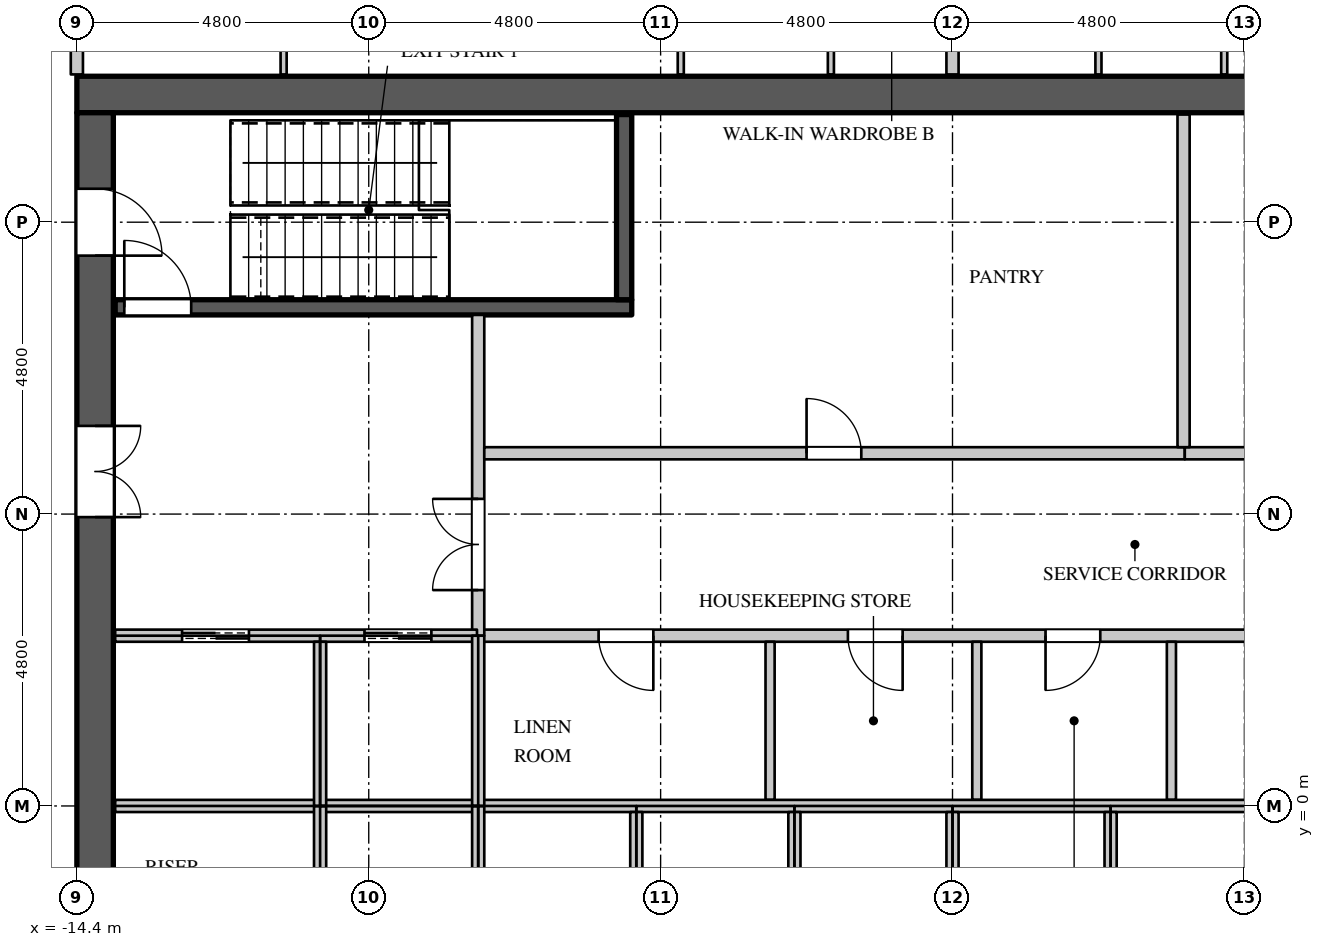
"""IFC4 building model, lengths in metres.
Left out: names, types, materials, properties, quantities, classifications, styles, units other than length and angle.
Written with IfcOpenShell. Run it as: python <this file> out.ifc"""

import sys

from ifc_helpers import new_model, si_unit, direction, frame, frame_2d, origin, place, context, subcontext, project, spatial, rectangle, extrude, element, fill, save


model = new_model("IFC4")
c1 = context("Model", 3, precision=1e-05, world=origin(), true_north=direction((0.0, 1.0)))
c2 = subcontext(c1, "Body", "Model", "MODEL_VIEW")
j1 = project(units=[si_unit("LENGTHUNIT", "METRE"), si_unit("PLANEANGLEUNIT", "RADIAN")], contexts=[c1])
p1 = place(None, origin())
s1 = spatial("IfcSite", under=j1, at=p1, CompositionType="ELEMENT")
p2 = place(p1, origin())
s2 = spatial("IfcBuilding", under=s1, at=p2, CompositionType="ELEMENT")
p3 = place(p2, frame((0.0, 0.0, 306.3)))
s3 = spatial("IfcBuildingStorey", under=s2, at=p3, CompositionType="ELEMENT", Elevation=306.3)
p4 = place(p3, frame((-14.4, 11.7, 0.0), z_axis=(0.0, 0.0, 1.0), x_axis=(1.0, 0.0, 0.0)))
e1 = element("IfcWall", 1, at=p4, inside=s3, PredefinedType="SHEAR", context=c2, shape_type="SweptSolid", body=[
    extrude(rectangle(XDim=28.8, YDim=0.6, at=frame_2d((14.4, 0.0))), origin(), (0.0, 0.0, 1.0), 4.2),
])
p5 = place(p3, frame((-14.1, -11.4, 0.0), z_axis=(0.0, 0.0, 1.0), x_axis=(0.0, 1.0, 0.0)))
e2 = element("IfcWall", 2, at=p5, inside=s3, PredefinedType="SHEAR", context=c2, shape_type="SweptSolid", body=[
    extrude(rectangle(XDim=22.8, YDim=0.6, at=frame_2d((11.4, 0.0))), origin(), (0.0, 0.0, 1.0), 4.2),
])
p6 = place(p5, frame((20.45, 0.0, 0.0)))
e3 = element("IfcOpeningElement", 3, at=p6, cuts=e2, PredefinedType="OPENING", context=c2, shape_type="SweptSolid", body=[
    extrude(rectangle(XDim=1.1, YDim=2.2, at=frame_2d((0.55, 1.1))), frame((0.0, 0.31, 0.0), z_axis=(0.0, -1.0, 0.0), x_axis=(1.0, 0.0, 0.0)), (0.0, 0.0, 1.0), 0.62),
])
p7 = place(p5, frame((1.25, 0.0, 0.0)))
e4 = element("IfcOpeningElement", 4, at=p7, cuts=e2, PredefinedType="OPENING", context=c2, shape_type="SweptSolid", body=[
    extrude(rectangle(XDim=1.1, YDim=2.2, at=frame_2d((0.55, 1.1))), frame((0.0, 0.31, 0.0), z_axis=(0.0, -1.0, 0.0), x_axis=(1.0, 0.0, 0.0)), (0.0, 0.0, 1.0), 0.62),
])
p8 = place(p5, frame((16.15, 0.0, 0.0)))
e5 = element("IfcOpeningElement", 5, at=p8, cuts=e2, PredefinedType="OPENING", context=c2, shape_type="SweptSolid", body=[
    extrude(rectangle(XDim=1.5, YDim=2.4, at=frame_2d((0.75, 1.2))), frame((0.0, 0.31, 0.0), z_axis=(0.0, -1.0, 0.0), x_axis=(1.0, 0.0, 0.0)), (0.0, 0.0, 1.0), 0.62),
])
p9 = place(p5, frame((5.15, 0.0, 0.0)))
e6 = element("IfcOpeningElement", 6, at=p9, cuts=e2, PredefinedType="OPENING", context=c2, shape_type="SweptSolid", body=[
    extrude(rectangle(XDim=1.5, YDim=2.4, at=frame_2d((0.75, 1.2))), frame((0.0, 0.31, 0.0), z_axis=(0.0, -1.0, 0.0), x_axis=(1.0, 0.0, 0.0)), (0.0, 0.0, 1.0), 0.62),
])
p10 = place(p3, frame((-14.4, 12.03, 0.0), z_axis=(0.0, 0.0, 1.0), x_axis=(0.0, 1.0, 0.0)))
e7 = element("IfcWall", 7, at=p10, inside=s3, PredefinedType="PARTITIONING", context=c2, shape_type="SweptSolid", body=[
    extrude(rectangle(XDim=2.27, YDim=0.2, at=frame_2d((1.135, 0.0))), origin(), (0.0, 0.0, 1.0), 3.9),
])
p11 = place(p3, frame((-7.82, 2.8, 0.0), z_axis=(0.0, 0.0, 1.0), x_axis=(1.0, 0.0, 0.0)))
e8 = element("IfcWall", 8, at=p11, inside=s3, PredefinedType="PARTITIONING", context=c2, shape_type="SweptSolid", body=[
    extrude(rectangle(XDim=18.24, YDim=0.2, at=frame_2d((9.12, 0.0))), origin(), (0.0, 0.0, 1.0), 3.9),
])
p12 = place(p11, frame((2.0, 0.0, 0.0)))
e9 = element("IfcOpeningElement", 9, at=p12, cuts=e8, PredefinedType="OPENING", context=c2, shape_type="SweptSolid", body=[
    extrude(rectangle(XDim=0.9, YDim=2.2, at=frame_2d((0.45, 1.1))), frame((0.0, 0.11, 0.0), z_axis=(0.0, -1.0, 0.0), x_axis=(1.0, 0.0, 0.0)), (0.0, 0.0, 1.0), 0.22),
])
p13 = place(p11, frame((6.1, 0.0, 0.0)))
e10 = element("IfcOpeningElement", 10, at=p13, cuts=e8, PredefinedType="OPENING", context=c2, shape_type="SweptSolid", body=[
    extrude(rectangle(XDim=0.9, YDim=2.2, at=frame_2d((0.45, 1.1))), frame((0.0, 0.11, 0.0), z_axis=(0.0, -1.0, 0.0), x_axis=(1.0, 0.0, 0.0)), (0.0, 0.0, 1.0), 0.22),
])
p14 = place(p11, frame((9.35, 0.0, 0.0)))
e11 = element("IfcOpeningElement", 11, at=p14, cuts=e8, PredefinedType="OPENING", context=c2, shape_type="SweptSolid", body=[
    extrude(rectangle(XDim=0.9, YDim=2.2, at=frame_2d((0.45, 1.1))), frame((0.0, 0.11, 0.0), z_axis=(0.0, -1.0, 0.0), x_axis=(1.0, 0.0, 0.0)), (0.0, 0.0, 1.0), 0.22),
])
p15 = place(p11, frame((14.3, 0.0, 0.0)))
e12 = element("IfcOpeningElement", 12, at=p15, cuts=e8, PredefinedType="OPENING", context=c2, shape_type="SweptSolid", body=[
    extrude(rectangle(XDim=0.9, YDim=2.2, at=frame_2d((0.45, 1.1))), frame((0.0, 0.11, 0.0), z_axis=(0.0, -1.0, 0.0), x_axis=(1.0, 0.0, 0.0)), (0.0, 0.0, 1.0), 0.22),
])
p16 = place(p3, frame((-7.8, 2.8, 0.0), z_axis=(0.0, 0.0, 1.0), x_axis=(0.0, 1.0, 0.0)))
e13 = element("IfcWall", 13, at=p16, inside=s3, PredefinedType="PARTITIONING", context=c2, shape_type="SweptSolid", body=[
    extrude(rectangle(XDim=5.275, YDim=0.2, at=frame_2d((2.637, 0.0))), origin(), (0.0, 0.0, 1.0), 3.9),
])
p17 = place(p16, frame((0.75, 0.0, 0.0)))
e14 = element("IfcOpeningElement", 14, at=p17, cuts=e13, PredefinedType="OPENING", context=c2, shape_type="SweptSolid", body=[
    extrude(rectangle(XDim=1.5, YDim=2.4, at=frame_2d((0.75, 1.2))), frame((0.0, 0.11, 0.0), z_axis=(0.0, -1.0, 0.0), x_axis=(1.0, 0.0, 0.0)), (0.0, 0.0, 1.0), 0.22),
])
p18 = place(p3, frame((-7.7, 5.8, 0.0), z_axis=(0.0, 0.0, 1.0), x_axis=(1.0, 0.0, 0.0)))
e15 = element("IfcWall", 15, at=p18, inside=s3, PredefinedType="PARTITIONING", context=c2, shape_type="SweptSolid", body=[
    extrude(rectangle(XDim=11.52, YDim=0.2, at=frame_2d((5.76, 0.0))), origin(), (0.0, 0.0, 1.0), 3.9),
])
p19 = place(p18, frame((5.3, 0.0, 0.0)))
e16 = element("IfcOpeningElement", 16, at=p19, cuts=e15, PredefinedType="OPENING", context=c2, shape_type="SweptSolid", body=[
    extrude(rectangle(XDim=0.9, YDim=2.2, at=frame_2d((0.45, 1.1))), frame((0.0, 0.11, 0.0), z_axis=(0.0, -1.0, 0.0), x_axis=(1.0, 0.0, 0.0)), (0.0, 0.0, 1.0), 0.22),
])
for number, where, z_axis, x_axis in (
    (17, (-3.0, 0.1, 0.0), (0.0, 0.0, 1.0), (0.0, 1.0, 0.0)),
    (18, (0.4, 0.1, 0.0), (0.0, 0.0, 1.0), (0.0, 1.0, 0.0)),
    (19, (3.6, 0.1, 0.0), (0.0, 0.0, 1.0), (0.0, 1.0, 0.0)),
):
    element("IfcWall", number, at=place(p3, frame(where, z_axis=z_axis, x_axis=x_axis)), inside=s3, PredefinedType="PARTITIONING", context=c2, shape_type="SweptSolid", body=[
        extrude(rectangle(XDim=2.6, YDim=0.15, at=frame_2d((1.3, 0.0))), origin(), (0.0, 0.0, 1.0), 3.9),
    ])
p20 = place(p3, frame((0.0, 12.03, 0.0), z_axis=(0.0, 0.0, 1.0), x_axis=(0.0, 1.0, 0.0)))
e20 = element("IfcWall", 20, at=p20, inside=s3, PredefinedType="PARTITIONING", context=c2, shape_type="SweptSolid", body=[
    extrude(rectangle(XDim=14.425, YDim=0.2, at=frame_2d((7.212, 0.0))), origin(), (0.0, 0.0, 1.0), 3.9),
])
p21 = place(p3, frame((3.82, 5.8, 0.0), z_axis=(0.0, 0.0, 1.0), x_axis=(1.0, 0.0, 0.0)))
e21 = element("IfcWall", 21, at=p21, inside=s3, PredefinedType="PARTITIONING", context=c2, shape_type="SweptSolid", body=[
    extrude(rectangle(XDim=9.95, YDim=0.2, at=frame_2d((4.975, 0.0))), origin(), (0.0, 0.0, 1.0), 3.9),
])
p22 = place(p21, frame((4.5, 0.0, 0.0)))
e22 = element("IfcOpeningElement", 22, at=p22, cuts=e21, PredefinedType="OPENING", context=c2, shape_type="SweptSolid", body=[
    extrude(rectangle(XDim=0.9, YDim=2.2, at=frame_2d((0.45, 1.1))), frame((0.0, 0.11, 0.0), z_axis=(0.0, -1.0, 0.0), x_axis=(1.0, 0.0, 0.0)), (0.0, 0.0, 1.0), 0.22),
])
p23 = place(p3, frame((3.8, 5.9, 0.0), z_axis=(0.0, 0.0, 1.0), x_axis=(0.0, 1.0, 0.0)))
e23 = element("IfcWall", 23, at=p23, inside=s3, PredefinedType="PARTITIONING", context=c2, shape_type="SweptSolid", body=[
    extrude(rectangle(XDim=5.47, YDim=0.2, at=frame_2d((2.735, 0.0))), origin(), (0.0, 0.0, 1.0), 3.9),
])
p24 = place(p3, frame((-13.77, 0.0, 0.0), z_axis=(0.0, 0.0, 1.0), x_axis=(1.0, 0.0, 0.0)))
e24 = element("IfcWall", 24, at=p24, inside=s3, PredefinedType="PARTITIONING", context=c2, shape_type="SweptSolid", body=[
    extrude(rectangle(XDim=21.57, YDim=0.2, at=frame_2d((10.785, 0.0))), origin(), (0.0, 0.0, 1.0), 3.9),
])
p25 = place(p3, frame((-13.77, 2.8, 0.0), z_axis=(0.0, 0.0, 1.0), x_axis=(1.0, 0.0, 0.0)))
e25 = element("IfcWall", 25, at=p25, inside=s3, PredefinedType="PARTITIONING", context=c2, shape_type="SweptSolid", body=[
    extrude(rectangle(XDim=5.95, YDim=0.2, at=frame_2d((2.975, 0.0))), origin(), (0.0, 0.0, 1.0), 3.9),
])
p26 = place(p25, frame((1.1, 0.0, 0.0)))
e26 = element("IfcOpeningElement", 26, at=p26, cuts=e25, PredefinedType="OPENING", context=c2, shape_type="SweptSolid", body=[
    extrude(rectangle(XDim=1.1, YDim=2.2, at=frame_2d((0.55, 1.1))), frame((0.0, 0.11, 0.0), z_axis=(0.0, -1.0, 0.0), x_axis=(1.0, 0.0, 0.0)), (0.0, 0.0, 1.0), 0.22),
])
p27 = place(p25, frame((4.1, 0.0, 0.0)))
e27 = element("IfcOpeningElement", 27, at=p27, cuts=e25, PredefinedType="OPENING", context=c2, shape_type="SweptSolid", body=[
    extrude(rectangle(XDim=1.1, YDim=2.2, at=frame_2d((0.55, 1.1))), frame((0.0, 0.11, 0.0), z_axis=(0.0, -1.0, 0.0), x_axis=(1.0, 0.0, 0.0)), (0.0, 0.0, 1.0), 0.22),
])
for number, where, z_axis, x_axis in (
    (28, (-10.4, -2.7, 0.0), (0.0, 0.0, 1.0), (0.0, 1.0, 0.0)),
    (29, (-10.4, 0.0, 0.0), (0.0, 0.0, 1.0), (0.0, 1.0, 0.0)),
):
    element("IfcWall", number, at=place(p3, frame(where, z_axis=z_axis, x_axis=x_axis)), inside=s3, PredefinedType="PARTITIONING", context=c2, shape_type="SweptSolid", body=[
        extrude(rectangle(XDim=2.7, YDim=0.2, at=frame_2d((1.35, 0.0))), origin(), (0.0, 0.0, 1.0), 3.9),
    ])
for number, where, z_axis, x_axis in (
    (30, (-7.8, -2.8, 0.0), (0.0, 0.0, 1.0), (0.0, 1.0, 0.0)),
    (31, (-7.8, 0.0, 0.0), (0.0, 0.0, 1.0), (0.0, 1.0, 0.0)),
):
    element("IfcWall", number, at=place(p3, frame(where, z_axis=z_axis, x_axis=x_axis)), inside=s3, PredefinedType="PARTITIONING", context=c2, shape_type="SweptSolid", body=[
        extrude(rectangle(XDim=2.8, YDim=0.2, at=frame_2d((1.4, 0.0))), origin(), (0.0, 0.0, 1.0), 3.9),
    ])
for number, where, z_axis, x_axis in (
    (32, (-5.2, -2.7, 0.0), (0.0, 0.0, 1.0), (0.0, 1.0, 0.0)),
    (33, (-2.6, -2.7, 0.0), (0.0, 0.0, 1.0), (0.0, 1.0, 0.0)),
    (34, (0.0, -2.7, 0.0), (0.0, 0.0, 1.0), (0.0, 1.0, 0.0)),
    (35, (2.6, -2.7, 0.0), (0.0, 0.0, 1.0), (0.0, 1.0, 0.0)),
):
    element("IfcWall", number, at=place(p3, frame(where, z_axis=z_axis, x_axis=x_axis)), inside=s3, PredefinedType="PARTITIONING", context=c2, shape_type="SweptSolid", body=[
        extrude(rectangle(XDim=2.6, YDim=0.2, at=frame_2d((1.3, 0.0))), origin(), (0.0, 0.0, 1.0), 3.9),
    ])
p28 = place(p3, frame((-13.77, 8.2, 0.0), z_axis=(0.0, 0.0, 1.0), x_axis=(1.0, 0.0, 0.0)))
e36 = element("IfcWall", 36, at=p28, inside=s3, PredefinedType="SHEAR", context=c2, shape_type="SweptSolid", body=[
    extrude(rectangle(XDim=8.495, YDim=0.25, at=frame_2d((4.248, 0.0))), origin(), (0.0, 0.0, 1.0), 3.9),
])
p29 = place(p28, frame((0.15, 0.0, 0.0)))
e37 = element("IfcOpeningElement", 37, at=p29, cuts=e36, PredefinedType="OPENING", context=c2, shape_type="SweptSolid", body=[
    extrude(rectangle(XDim=1.1, YDim=2.2, at=frame_2d((0.55, 1.1))), frame((0.0, 0.135, 0.0), z_axis=(0.0, -1.0, 0.0), x_axis=(1.0, 0.0, 0.0)), (0.0, 0.0, 1.0), 0.27),
])
p30 = place(p3, frame((-5.4, 8.325, 0.0), z_axis=(0.0, 0.0, 1.0), x_axis=(0.0, 1.0, 0.0)))
e38 = element("IfcWall", 38, at=p30, inside=s3, PredefinedType="SHEAR", context=c2, shape_type="SweptSolid", body=[
    extrude(rectangle(XDim=3.045, YDim=0.25, at=frame_2d((1.522, 0.0))), origin(), (0.0, 0.0, 1.0), 3.9),
])
p31 = place(p3, frame((-11.0, 12.03, 0.0), z_axis=(0.0, 0.0, 1.0), x_axis=(0.0, 1.0, 0.0)))
e39 = element("IfcWall", 39, at=p31, inside=s3, PredefinedType="PARTITIONING", context=c2, shape_type="SweptSolid", body=[
    extrude(rectangle(XDim=6.195, YDim=0.1, at=frame_2d((3.098, 0.0))), origin(), (0.0, 0.0, 1.0), 3.9),
])
p32 = place(p31, frame((2.65, 0.0, 0.0)))
e40 = element("IfcOpeningElement", 40, at=p32, cuts=e39, PredefinedType="OPENING", context=c2, shape_type="SweptSolid", body=[
    extrude(rectangle(XDim=0.9, YDim=2.2, at=frame_2d((0.45, 1.1))), frame((0.0, 0.06, 0.0), z_axis=(0.0, -1.0, 0.0), x_axis=(1.0, 0.0, 0.0)), (0.0, 0.0, 1.0), 0.12),
])
p33 = place(p3, frame((-4.469, 12.03, 0.0), z_axis=(0.0, 0.0, 1.0), x_axis=(0.0, 1.0, 0.0)))
e41 = element("IfcWall", 41, at=p33, inside=s3, PredefinedType="PARTITIONING", context=c2, shape_type="SweptSolid", body=[
    extrude(rectangle(XDim=5.75, YDim=0.1, at=frame_2d((2.875, 0.0))), origin(), (0.0, 0.0, 1.0), 3.3),
])
p34 = place(p3, frame((-2.0, 12.03, 0.0), z_axis=(0.0, 0.0, 1.0), x_axis=(0.0, 1.0, 0.0)))
e42 = element("IfcWall", 42, at=p34, inside=s3, PredefinedType="PARTITIONING", context=c2, shape_type="SweptSolid", body=[
    extrude(rectangle(XDim=5.72, YDim=0.1, at=frame_2d((2.86, 0.0))), origin(), (0.0, 0.0, 1.0), 3.9),
])
p35 = place(p3, frame((2.4, 12.03, 0.0), z_axis=(0.0, 0.0, 1.0), x_axis=(0.0, 1.0, 0.0)))
e43 = element("IfcWall", 43, at=p35, inside=s3, PredefinedType="PARTITIONING", context=c2, shape_type="SweptSolid", body=[
    extrude(rectangle(XDim=5.52, YDim=0.1, at=frame_2d((2.76, 0.0))), origin(), (0.0, 0.0, 1.0), 3.9),
])
p36 = place(p3, frame((4.469, 12.03, 0.0), z_axis=(0.0, 0.0, 1.0), x_axis=(0.0, 1.0, 0.0)))
e44 = element("IfcWall", 44, at=p36, inside=s3, PredefinedType="PARTITIONING", context=c2, shape_type="SweptSolid", body=[
    extrude(rectangle(XDim=5.55, YDim=0.1, at=frame_2d((2.775, 0.0))), origin(), (0.0, 0.0, 1.0), 3.3),
])
p37 = place(p19, origin())
e45 = element("IfcDoor", 45, at=p37, inside=s3, OperationType="SINGLE_SWING_LEFT", PredefinedType="DOOR", context=c2, shape_type="SweptSolid", body=[
    extrude(rectangle(XDim=0.9, YDim=2.2, at=frame_2d((0.45, 1.1))), frame((0.0, 0.025, 0.0), z_axis=(0.0, -1.0, 0.0), x_axis=(1.0, 0.0, 0.0)), (0.0, 0.0, 1.0), 0.05),
])
fill(e16, e45)
p38 = place(p12, origin())
e46 = element("IfcDoor", 46, at=p38, inside=s3, OperationType="SINGLE_SWING_LEFT", PredefinedType="DOOR", context=c2, shape_type="SweptSolid", body=[
    extrude(rectangle(XDim=0.9, YDim=2.2, at=frame_2d((0.45, 1.1))), frame((0.0, 0.025, 0.0), z_axis=(0.0, -1.0, 0.0), x_axis=(1.0, 0.0, 0.0)), (0.0, 0.0, 1.0), 0.05),
])
fill(e9, e46)
p39 = place(p13, origin())
e47 = element("IfcDoor", 47, at=p39, inside=s3, OperationType="SINGLE_SWING_LEFT", PredefinedType="DOOR", context=c2, shape_type="SweptSolid", body=[
    extrude(rectangle(XDim=0.9, YDim=2.2, at=frame_2d((0.45, 1.1))), frame((0.0, 0.025, 0.0), z_axis=(0.0, -1.0, 0.0), x_axis=(1.0, 0.0, 0.0)), (0.0, 0.0, 1.0), 0.05),
])
fill(e10, e47)
p40 = place(p14, origin())
e48 = element("IfcDoor", 48, at=p40, inside=s3, OperationType="SINGLE_SWING_RIGHT", PredefinedType="DOOR", context=c2, shape_type="SweptSolid", body=[
    extrude(rectangle(XDim=0.9, YDim=2.2, at=frame_2d((0.45, 1.1))), frame((0.0, 0.025, 0.0), z_axis=(0.0, -1.0, 0.0), x_axis=(1.0, 0.0, 0.0)), (0.0, 0.0, 1.0), 0.05),
])
fill(e11, e48)
p41 = place(p26, origin())
e49 = element("IfcDoor", 49, at=p41, inside=s3, OperationType="DOUBLE_DOOR_SLIDING", PredefinedType="DOOR", context=c2, shape_type="SweptSolid", body=[
    extrude(rectangle(XDim=1.1, YDim=2.2, at=frame_2d((0.55, 1.1))), frame((0.0, 0.025, 0.0), z_axis=(0.0, -1.0, 0.0), x_axis=(1.0, 0.0, 0.0)), (0.0, 0.0, 1.0), 0.05),
])
fill(e26, e49)
p42 = place(p27, origin())
e50 = element("IfcDoor", 50, at=p42, inside=s3, OperationType="DOUBLE_DOOR_SLIDING", PredefinedType="DOOR", context=c2, shape_type="SweptSolid", body=[
    extrude(rectangle(XDim=1.1, YDim=2.2, at=frame_2d((0.55, 1.1))), frame((0.0, 0.025, 0.0), z_axis=(0.0, -1.0, 0.0), x_axis=(1.0, 0.0, 0.0)), (0.0, 0.0, 1.0), 0.05),
])
fill(e27, e50)
p43 = place(p29, origin())
e51 = element("IfcDoor", 51, at=p43, inside=s3, OperationType="SINGLE_SWING_LEFT", PredefinedType="DOOR", context=c2, shape_type="SweptSolid", body=[
    extrude(rectangle(XDim=1.1, YDim=2.2, at=frame_2d((0.55, 1.1))), frame((0.0, 0.025, 0.0), z_axis=(0.0, -1.0, 0.0), x_axis=(1.0, 0.0, 0.0)), (0.0, 0.0, 1.0), 0.05),
])
fill(e37, e51)
p44 = place(p17, origin())
e52 = element("IfcDoor", 52, at=p44, inside=s3, OperationType="DOUBLE_DOOR_SINGLE_SWING", PredefinedType="DOOR", context=c2, shape_type="SweptSolid", body=[
    extrude(rectangle(XDim=1.5, YDim=2.4, at=frame_2d((0.75, 1.2))), frame((0.0, 0.025, 0.0), z_axis=(0.0, -1.0, 0.0), x_axis=(1.0, 0.0, 0.0)), (0.0, 0.0, 1.0), 0.05),
])
fill(e14, e52)
p45 = place(p6, origin())
e53 = element("IfcDoor", 53, at=p45, inside=s3, OperationType="SINGLE_SWING_RIGHT", PredefinedType="DOOR", context=c2, shape_type="SweptSolid", body=[
    extrude(rectangle(XDim=1.1, YDim=2.2, at=frame_2d((0.55, 1.1))), frame((0.0, -0.245, 0.0), z_axis=(0.0, -1.0, 0.0), x_axis=(1.0, 0.0, 0.0)), (0.0, 0.0, 1.0), 0.05),
])
fill(e3, e53)
p46 = place(p8, origin())
e54 = element("IfcDoor", 54, at=p46, inside=s3, OperationType="DOUBLE_DOOR_SINGLE_SWING", PredefinedType="DOOR", context=c2, shape_type="SweptSolid", body=[
    extrude(rectangle(XDim=1.5, YDim=2.4, at=frame_2d((0.75, 1.2))), frame((0.0, -0.245, 0.0), z_axis=(0.0, -1.0, 0.0), x_axis=(1.0, 0.0, 0.0)), (0.0, 0.0, 1.0), 0.05),
])
fill(e5, e54)
save(model, sys.argv[1])
